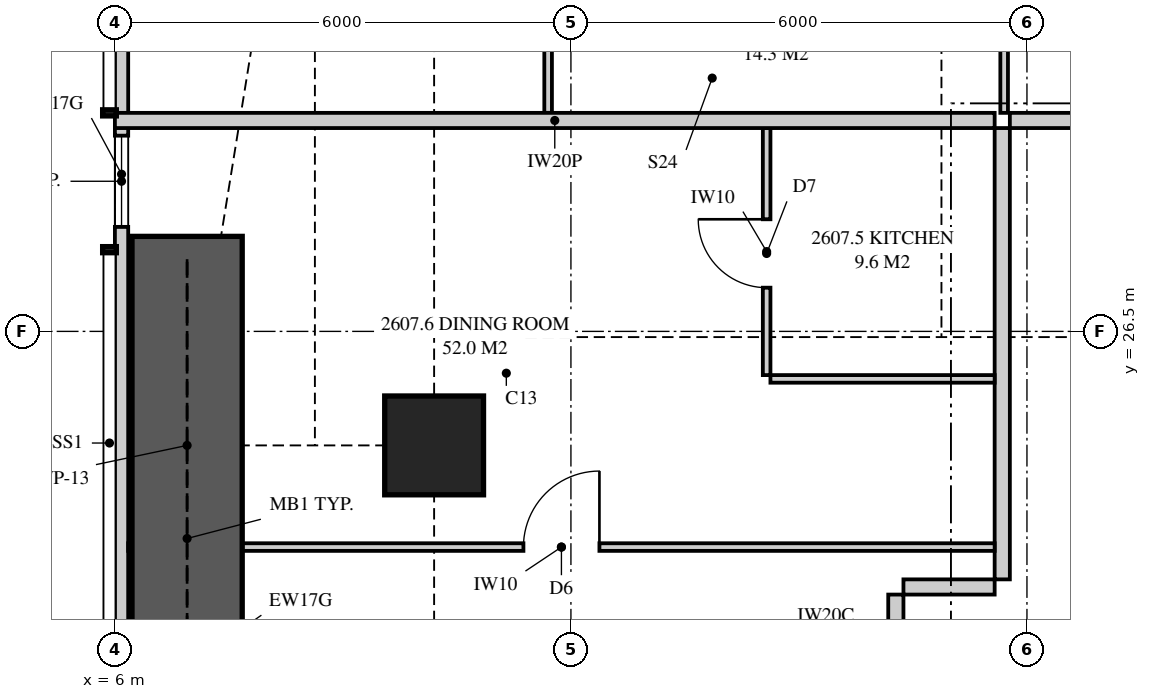
"""IFC4 building model, lengths in metres.
Left out: names, types, materials, properties, quantities, classifications, styles, units other than length and angle.
Written with IfcOpenShell. Run it as: python <this file> out.ifc"""

import sys

from ifc_helpers import new_model, si_unit, direction, frame, frame_2d, origin, origin_2d, place, context, subcontext, project, spatial, polyline, rectangle, outline, extrude, element, fill, save


model = new_model("IFC4")
c1 = context("Model", 3, precision=1e-05, world=origin(), true_north=direction((0.0, 1.0)))
c2 = subcontext(c1, "Body", "Model", "MODEL_VIEW")
j1 = project(units=[si_unit("LENGTHUNIT", "METRE"), si_unit("PLANEANGLEUNIT", "RADIAN")], contexts=[c1])
p1 = place(None, origin())
s1 = spatial("IfcSite", under=j1, at=p1, CompositionType="ELEMENT")
p2 = place(p1, origin())
s2 = spatial("IfcBuilding", under=s1, at=p2, CompositionType="ELEMENT")
p3 = place(p2, frame((0.0, 0.0, 98.15)))
s3 = spatial("IfcBuildingStorey", under=s2, at=p3, CompositionType="ELEMENT", Elevation=98.15)
p4 = place(p3, frame((10.2, 25.0, 0.0), z_axis=(0.0, 0.0, 1.0), x_axis=(1.0, 0.0, 0.0)))
e1 = element("IfcColumn", 1, at=p4, inside=s3, PredefinedType="COLUMN", context=c2, shape_type="SweptSolid", body=[
    extrude(rectangle(XDim=1.3, YDim=1.3, at=origin_2d()), origin(), (0.0, 0.0, 1.0), 3.35),
])
p5 = place(p3, frame((6.087, 34.949, 0.0), z_axis=(0.0, 0.0, 1.0), x_axis=(0.0, -1.0, 0.0)))
e2 = element("IfcWall", 2, at=p5, inside=s3, PredefinedType="SOLIDWALL", context=c2, shape_type="SweptSolid", body=[
    extrude(outline(polyline([(0.0, 0.0), (12.761, 0.0), (12.761, 2.15), (9.949, 2.15), (9.949, 3.11), (9.823, 3.11), (9.823, 2.15), (9.73, 2.15), (9.73, 3.11), (0.0, 3.11), (0.0, 0.0)])), frame((0.0, 0.087, 0.0), z_axis=(0.0, -1.0, 0.0), x_axis=(1.0, 0.0, 0.0)), (0.0, 0.0, 1.0), 0.175),
])
p6 = place(p5, frame((2.724, 0.0, 0.4)))
e3 = element("IfcOpeningElement", 3, at=p6, cuts=e2, PredefinedType="OPENING", context=c2, shape_type="SweptSolid", body=[
    extrude(rectangle(XDim=1.8, YDim=1.7, at=frame_2d((0.9, 0.85))), frame((0.0, 0.097, 0.0), z_axis=(0.0, -1.0, 0.0), x_axis=(1.0, 0.0, 0.0)), (0.0, 0.0, 1.0), 0.195),
])
p7 = place(p5, frame((5.874, 0.0, 0.4)))
e4 = element("IfcOpeningElement", 4, at=p7, cuts=e2, PredefinedType="OPENING", context=c2, shape_type="SweptSolid", body=[
    extrude(rectangle(XDim=1.2, YDim=1.7, at=frame_2d((0.6, 0.85))), frame((0.0, 0.097, 0.0), z_axis=(0.0, -1.0, 0.0), x_axis=(1.0, 0.0, 0.0)), (0.0, 0.0, 1.0), 0.195),
])
p8 = place(p3, frame((17.775, 29.275, 0.0), z_axis=(0.0, 0.0, 1.0), x_axis=(1.0, 0.0, 0.0)))
e5 = element("IfcWall", 5, at=p8, inside=s3, PredefinedType="PARTITIONING", context=c2, shape_type="SweptSolid", body=[
    extrude(rectangle(XDim=4.325, YDim=0.2, at=frame_2d((2.163, 0.0))), origin(), (0.0, 0.0, 1.0), 3.11),
])
p9 = place(p3, frame((11.7, 37.825, 0.0), z_axis=(0.0, 0.0, 1.0), x_axis=(0.0, -1.0, 0.0)))
e6 = element("IfcWall", 6, at=p9, inside=s3, PredefinedType="PARTITIONING", context=c2, shape_type="SweptSolid", body=[
    extrude(outline(polyline([(0.0, 0.0), (8.45, 0.0), (8.45, 3.11), (2.708, 3.11), (2.708, 2.15), (0.953, 2.15), (0.953, 3.11), (0.0, 3.11), (0.0, 0.0)])), frame((0.0, 0.05, 0.0), z_axis=(0.0, -1.0, 0.0), x_axis=(1.0, 0.0, 0.0)), (0.0, 0.0, 1.0), 0.1),
])
p10 = place(p9, frame((2.701, 0.0, 0.0)))
e7 = element("IfcOpeningElement", 7, at=p10, cuts=e6, PredefinedType="OPENING", context=c2, shape_type="SweptSolid", body=[
    extrude(rectangle(XDim=0.9, YDim=2.1, at=frame_2d((0.45, 1.05))), frame((0.0, 0.06, 0.0), z_axis=(0.0, -1.0, 0.0), x_axis=(1.0, 0.0, 0.0)), (0.0, 0.0, 1.0), 0.12),
])
p11 = place(p9, frame((6.025, 0.0, 0.0)))
e8 = element("IfcOpeningElement", 8, at=p11, cuts=e6, PredefinedType="OPENING", context=c2, shape_type="SweptSolid", body=[
    extrude(rectangle(XDim=0.9, YDim=2.1, at=frame_2d((0.45, 1.05))), frame((0.0, 0.06, 0.0), z_axis=(0.0, -1.0, 0.0), x_axis=(1.0, 0.0, 0.0)), (0.0, 0.0, 1.0), 0.12),
])
p12 = place(p3, frame((17.7, 37.825, 0.0), z_axis=(0.0, 0.0, 1.0), x_axis=(0.0, -1.0, 0.0)))
e9 = element("IfcWall", 9, at=p12, inside=s3, PredefinedType="PARTITIONING", context=c2, shape_type="SweptSolid", body=[
    extrude(outline(polyline([(1.635, 2.15), (0.0, 2.15), (0.0, 0.0), (8.45, 0.0), (8.45, 3.11), (1.635, 3.11), (1.635, 2.15)]), holes=[polyline([(1.021, 0.116), (0.529, 0.116), (0.529, 0.906), (1.021, 0.906), (1.021, 0.116)]), polyline([(1.021, 1.244), (0.529, 1.244), (0.529, 2.034), (1.021, 2.034), (1.021, 1.244)])]), frame((0.0, 0.05, 0.0), z_axis=(0.0, -1.0, 0.0), x_axis=(1.0, 0.0, 0.0)), (0.0, 0.0, 1.0), 0.1),
])
p13 = place(p12, frame((4.6, 0.0, 0.0)))
e10 = element("IfcOpeningElement", 10, at=p13, cuts=e9, PredefinedType="OPENING", context=c2, shape_type="SweptSolid", body=[
    extrude(rectangle(XDim=0.9, YDim=2.1, at=frame_2d((0.45, 1.05))), frame((0.0, 0.06, 0.0), z_axis=(0.0, -1.0, 0.0), x_axis=(1.0, 0.0, 0.0)), (0.0, 0.0, 1.0), 0.12),
])
p14 = place(p3, frame((6.0, 29.275, 0.0), z_axis=(0.0, 0.0, 1.0), x_axis=(1.0, 0.0, 0.0)))
e11 = element("IfcWall", 11, at=p14, inside=s3, PredefinedType="PARTITIONING", context=c2, shape_type="SweptSolid", body=[
    extrude(outline(polyline([(0.0, 0.0), (11.575, 0.0), (11.575, 3.11), (11.212, 3.11), (11.212, 2.541), (10.538, 2.541), (10.538, 3.11), (5.51, 3.11), (5.51, 2.51), (2.969, 2.51), (2.969, 2.541), (2.565, 2.541), (2.565, 2.15), (0.721, 2.15), (0.721, 3.11), (0.0, 3.11), (0.0, 0.0)])), frame((0.0, 0.1, 0.0), z_axis=(0.0, -1.0, 0.0), x_axis=(1.0, 0.0, 0.0)), (0.0, 0.0, 1.0), 0.2),
])
p15 = place(p3, frame((14.575, 25.925, 0.0), z_axis=(0.0, 0.0, 1.0), x_axis=(0.0, 1.0, 0.0)))
e12 = element("IfcWall", 12, at=p15, inside=s3, PredefinedType="PARTITIONING", context=c2, shape_type="SweptSolid", body=[
    extrude(outline(polyline([(0.0, 0.0), (3.25, 0.0), (3.25, 3.11), (0.787, 3.11), (0.787, 2.541), (0.213, 2.541), (0.213, 3.11), (0.0, 3.11), (0.0, 0.0)])), frame((0.0, 0.05, 0.0), z_axis=(0.0, -1.0, 0.0), x_axis=(1.0, 0.0, 0.0)), (0.0, 0.0, 1.0), 0.1),
])
p16 = place(p15, frame((1.15, 0.0, 0.0)))
e13 = element("IfcOpeningElement", 13, at=p16, cuts=e12, PredefinedType="OPENING", context=c2, shape_type="SweptSolid", body=[
    extrude(rectangle(XDim=0.9, YDim=2.1, at=frame_2d((0.45, 1.05))), frame((0.0, 0.06, 0.0), z_axis=(0.0, -1.0, 0.0), x_axis=(1.0, 0.0, 0.0)), (0.0, 0.0, 1.0), 0.12),
])
p17 = place(p3, frame((14.625, 25.875, 0.0), z_axis=(0.0, 0.0, 1.0), x_axis=(1.0, 0.0, 0.0)))
e14 = element("IfcWall", 14, at=p17, inside=s3, PredefinedType="PARTITIONING", context=c2, shape_type="SweptSolid", body=[
    extrude(rectangle(XDim=2.95, YDim=0.1, at=frame_2d((1.475, 0.0))), origin(), (0.0, 0.0, 1.0), 3.11),
])
p18 = place(p3, frame((6.175, 23.663, 0.0), z_axis=(0.0, 0.0, 1.0), x_axis=(1.0, 0.0, 0.0)))
e15 = element("IfcWall", 15, at=p18, inside=s3, PredefinedType="PARTITIONING", context=c2, shape_type="SweptSolid", body=[
    extrude(outline(polyline([(0.529, 2.15), (0.0, 2.15), (0.0, 0.0), (0.529, 0.0), (0.529, 0.556), (1.021, 0.556), (1.021, 0.0), (11.4, 0.0), (11.4, 3.11), (5.285, 3.11), (5.285, 2.51), (2.765, 2.51), (2.765, 3.11), (1.635, 3.11), (1.635, 2.15), (1.021, 2.15), (1.021, 1.594), (0.529, 1.594), (0.529, 2.15)])), frame((0.0, 0.05, 0.0), z_axis=(0.0, -1.0, 0.0), x_axis=(1.0, 0.0, 0.0)), (0.0, 0.0, 1.0), 0.1),
])
p19 = place(p18, frame((5.2, 0.0, 0.0)))
e16 = element("IfcOpeningElement", 16, at=p19, cuts=e15, PredefinedType="OPENING", context=c2, shape_type="SweptSolid", body=[
    extrude(rectangle(XDim=1.0, YDim=2.1, at=frame_2d((0.5, 1.05))), frame((0.0, 0.06, 0.0), z_axis=(0.0, -1.0, 0.0), x_axis=(1.0, 0.0, 0.0)), (0.0, 0.0, 1.0), 0.12),
])
p20 = place(p3, frame((17.675, 23.238, 0.0), z_axis=(0.0, 0.0, 1.0), x_axis=(0.0, 1.0, 0.0)))
e17 = element("IfcWall", 17, at=p20, inside=s3, PredefinedType="PARTITIONING", context=c2, shape_type="SweptSolid", body=[
    extrude(outline(polyline([(0.0, 0.0), (5.938, 0.0), (5.938, 3.11), (3.525, 3.11), (3.525, 2.541), (2.85, 2.541), (2.85, 3.11), (0.0, 3.11), (0.0, 0.0)])), frame((0.0, 0.1, 0.0), z_axis=(0.0, -1.0, 0.0), x_axis=(1.0, 0.0, 0.0)), (0.0, 0.0, 1.0), 0.2),
])
p21 = place(p3, frame((16.275, 20.637, 0.0), z_axis=(0.0, 0.0, 1.0), x_axis=(0.0, 1.0, 0.0)))
e18 = element("IfcWall", 18, at=p21, inside=s3, PredefinedType="PARTITIONING", context=c2, shape_type="SweptSolid", body=[
    extrude(rectangle(XDim=2.4, YDim=0.2, at=frame_2d((1.2, 0.0))), origin(), (0.0, 0.0, 1.0), 3.11),
])
p22 = place(p21, frame((0.7, 0.0, 0.0)))
e19 = element("IfcOpeningElement", 19, at=p22, cuts=e18, PredefinedType="OPENING", context=c2, shape_type="SweptSolid", body=[
    extrude(rectangle(XDim=1.05, YDim=2.2, at=frame_2d((0.525, 1.1))), frame((0.0, 0.11, 0.0), z_axis=(0.0, -1.0, 0.0), x_axis=(1.0, 0.0, 0.0)), (0.0, 0.0, 1.0), 0.22),
])
p23 = place(p3, frame((17.575, 23.137, 0.0), z_axis=(0.0, 0.0, 1.0), x_axis=(-1.0, 0.0, 0.0)))
e20 = element("IfcWall", 20, at=p23, inside=s3, PredefinedType="PARTITIONING", context=c2, shape_type="SweptSolid", body=[
    extrude(rectangle(XDim=1.2, YDim=0.2, at=frame_2d((0.6, 0.0))), origin(), (0.0, 0.0, 1.0), 3.11),
])
p24 = place(p3, frame((6.95, 22.25, 0.0), z_axis=(0.0, 0.0, 1.0), x_axis=(0.0, 1.0, 0.0)))
e21 = element("IfcWall", 21, at=p24, inside=s3, PredefinedType="SHEAR", context=c2, shape_type="SweptSolid", body=[
    extrude(rectangle(XDim=5.5, YDim=1.45, at=frame_2d((2.75, 0.0))), origin(), (0.0, 0.0, 1.0), 3.35),
])
p25 = place(p7, origin())
e22 = element("IfcWindow", 22, at=p25, inside=s3, PartitioningType="SINGLE_PANEL", PredefinedType="WINDOW", context=c2, shape_type="SweptSolid", body=[
    extrude(rectangle(XDim=1.2, YDim=1.7, at=frame_2d((0.6, 0.85))), frame((0.0, 0.03, 0.0), z_axis=(0.0, -1.0, 0.0), x_axis=(1.0, 0.0, 0.0)), (0.0, 0.0, 1.0), 0.06),
])
fill(e4, e22)
p26 = place(p16, origin())
e23 = element("IfcDoor", 23, at=p26, inside=s3, OperationType="SINGLE_SWING_RIGHT", PredefinedType="DOOR", context=c2, shape_type="SweptSolid", body=[
    extrude(rectangle(XDim=0.9, YDim=2.1, at=frame_2d((0.45, 1.05))), frame((0.0, 0.025, 0.0), z_axis=(0.0, -1.0, 0.0), x_axis=(1.0, 0.0, 0.0)), (0.0, 0.0, 1.0), 0.05),
])
fill(e13, e23)
p27 = place(p19, origin())
e24 = element("IfcDoor", 24, at=p27, inside=s3, OperationType="SINGLE_SWING_RIGHT", PredefinedType="DOOR", context=c2, shape_type="SweptSolid", body=[
    extrude(rectangle(XDim=1.0, YDim=2.1, at=frame_2d((0.5, 1.05))), frame((0.0, 0.025, 0.0), z_axis=(0.0, -1.0, 0.0), x_axis=(1.0, 0.0, 0.0)), (0.0, 0.0, 1.0), 0.05),
])
fill(e16, e24)
save(model, sys.argv[1])
